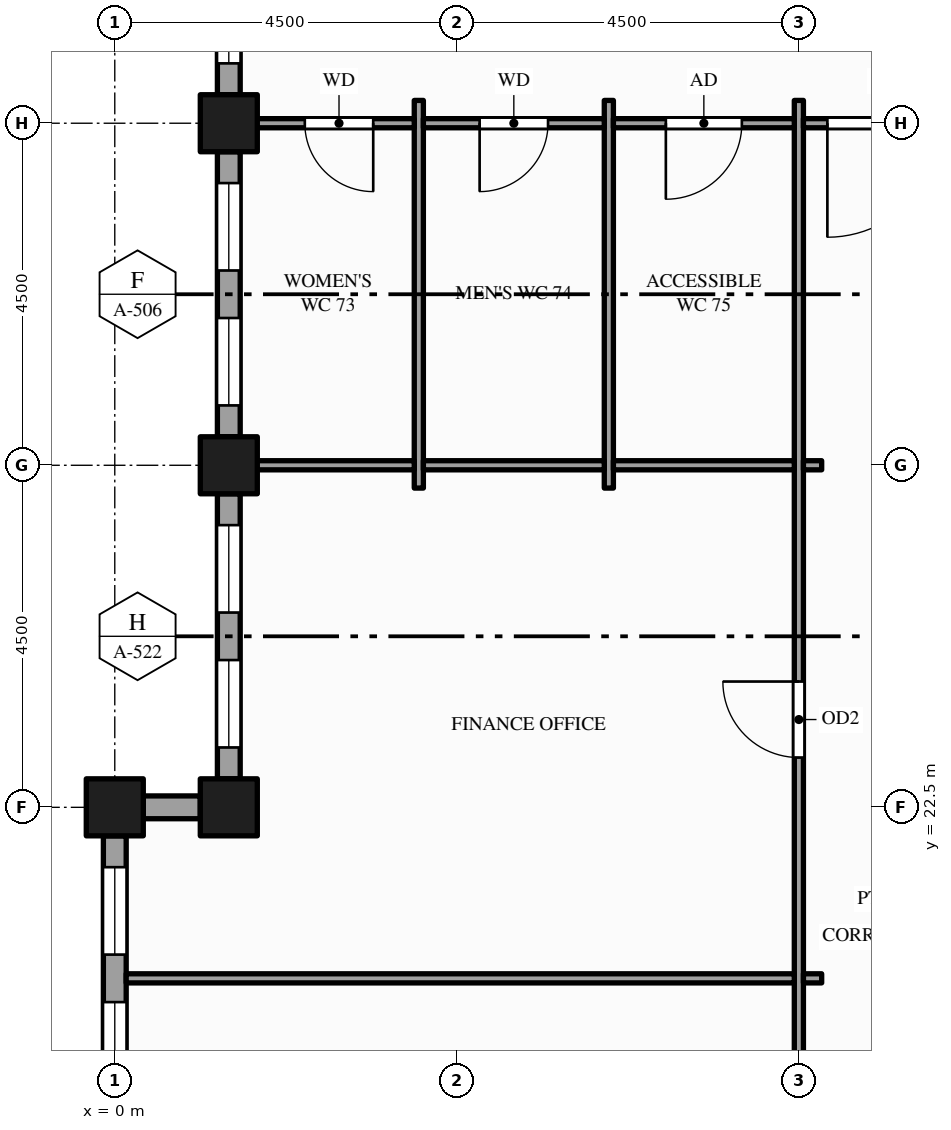
"""IFC4 building model, lengths in metres.
Left out: names, types, materials, properties, quantities, classifications, styles, units other than length and angle.
Written with IfcOpenShell. Run it as: python <this file> out.ifc"""

import sys

from ifc_helpers import new_model, si_unit, direction, frame, frame_2d, origin, origin_2d, place, context, subcontext, project, spatial, rectangle, hollow_rectangle, extrude, element, fill, save


model = new_model("IFC4")
c1 = context("Model", 3, precision=1e-05, world=origin(), true_north=direction((0.0, 1.0)))
c2 = subcontext(c1, "Body", "Model", "MODEL_VIEW")
j1 = project(units=[si_unit("LENGTHUNIT", "METRE"), si_unit("PLANEANGLEUNIT", "RADIAN")], contexts=[c1])
p1 = place(None, origin())
s1 = spatial("IfcSite", under=j1, at=p1, CompositionType="ELEMENT")
p2 = place(p1, origin())
s2 = spatial("IfcBuilding", under=s1, at=p2, CompositionType="ELEMENT")
p3 = place(p2, frame((0.0, 0.0, 223.0)))
s3 = spatial("IfcBuildingStorey", under=s2, at=p3, CompositionType="ELEMENT", Elevation=223.0)
for number, where, z_axis, x_axis in (
    (1, (0.0, 22.5, -0.15), (0.0, 0.0, 1.0), (1.0, 0.0, 0.0)),
    (2, (1.5, 22.5, -0.15), (0.0, 0.0, 1.0), (1.0, 0.0, 0.0)),
    (3, (1.5, 27.0, -0.15), (0.0, 0.0, 1.0), (1.0, 0.0, 0.0)),
    (4, (1.5, 31.5, -0.15), (0.0, 0.0, 1.0), (1.0, 0.0, 0.0)),
):
    element("IfcColumn", number, at=place(p3, frame(where, z_axis=z_axis, x_axis=x_axis)), inside=s3, PredefinedType="COLUMN", context=c2, shape_type="SweptSolid", body=[
        extrude(hollow_rectangle(XDim=0.75, YDim=0.75, WallThickness=0.036, at=origin_2d()), origin(), (0.0, 0.0, 1.0), 4.0),
    ])
p4 = place(p3, frame((1.5, 36.0, 0.0), z_axis=(0.0, 0.0, 1.0), x_axis=(0.0, -1.0, 0.0)))
e5 = element("IfcWall", 5, at=p4, inside=s3, PredefinedType="STANDARD", context=c2, shape_type="SweptSolid", body=[
    extrude(rectangle(XDim=4.125, YDim=0.3, at=frame_2d((2.062, 0.0))), origin(), (0.0, 0.0, 1.0), 3.157),
])
p5 = place(p4, frame((0.4, 0.0, 0.9)))
e6 = element("IfcOpeningElement", 6, at=p5, cuts=e5, PredefinedType="OPENING", context=c2, shape_type="SweptSolid", body=[
    extrude(rectangle(XDim=1.55, YDim=2.0, at=frame_2d((0.775, 1.0))), frame((0.0, 0.16, 0.0), z_axis=(0.0, -1.0, 0.0), x_axis=(1.0, 0.0, 0.0)), (0.0, 0.0, 1.0), 0.32),
])
p6 = place(p4, frame((2.562, 0.0, 0.9)))
e7 = element("IfcOpeningElement", 7, at=p6, cuts=e5, PredefinedType="OPENING", context=c2, shape_type="SweptSolid", body=[
    extrude(rectangle(XDim=1.15, YDim=2.0, at=frame_2d((0.575, 1.0))), frame((0.0, 0.16, 0.0), z_axis=(0.0, -1.0, 0.0), x_axis=(1.0, 0.0, 0.0)), (0.0, 0.0, 1.0), 0.32),
])
p7 = place(p3, frame((1.5, 31.125, 0.0), z_axis=(0.0, 0.0, 1.0), x_axis=(0.0, -1.0, 0.0)))
e8 = element("IfcWall", 8, at=p7, inside=s3, PredefinedType="STANDARD", context=c2, shape_type="SweptSolid", body=[
    extrude(rectangle(XDim=3.75, YDim=0.3, at=frame_2d((1.875, 0.0))), origin(), (0.0, 0.0, 1.0), 3.157),
])
p8 = place(p7, frame((0.413, 0.0, 0.9)))
e9 = element("IfcOpeningElement", 9, at=p8, cuts=e8, PredefinedType="OPENING", context=c2, shape_type="SweptSolid", body=[
    extrude(rectangle(XDim=1.15, YDim=2.0, at=frame_2d((0.575, 1.0))), frame((0.0, 0.16, 0.0), z_axis=(0.0, -1.0, 0.0), x_axis=(1.0, 0.0, 0.0)), (0.0, 0.0, 1.0), 0.32),
])
p9 = place(p7, frame((2.188, 0.0, 0.9)))
e10 = element("IfcOpeningElement", 10, at=p9, cuts=e8, PredefinedType="OPENING", context=c2, shape_type="SweptSolid", body=[
    extrude(rectangle(XDim=1.15, YDim=2.0, at=frame_2d((0.575, 1.0))), frame((0.0, 0.16, 0.0), z_axis=(0.0, -1.0, 0.0), x_axis=(1.0, 0.0, 0.0)), (0.0, 0.0, 1.0), 0.32),
])
p10 = place(p3, frame((1.5, 26.625, 0.0), z_axis=(0.0, 0.0, 1.0), x_axis=(0.0, -1.0, 0.0)))
e11 = element("IfcWall", 11, at=p10, inside=s3, PredefinedType="STANDARD", context=c2, shape_type="SweptSolid", body=[
    extrude(rectangle(XDim=3.75, YDim=0.3, at=frame_2d((1.875, 0.0))), origin(), (0.0, 0.0, 1.0), 3.157),
])
p11 = place(p10, frame((0.413, 0.0, 0.9)))
e12 = element("IfcOpeningElement", 12, at=p11, cuts=e11, PredefinedType="OPENING", context=c2, shape_type="SweptSolid", body=[
    extrude(rectangle(XDim=1.15, YDim=2.0, at=frame_2d((0.575, 1.0))), frame((0.0, 0.16, 0.0), z_axis=(0.0, -1.0, 0.0), x_axis=(1.0, 0.0, 0.0)), (0.0, 0.0, 1.0), 0.32),
])
p12 = place(p10, frame((2.188, 0.0, 0.9)))
e13 = element("IfcOpeningElement", 13, at=p12, cuts=e11, PredefinedType="OPENING", context=c2, shape_type="SweptSolid", body=[
    extrude(rectangle(XDim=1.15, YDim=2.0, at=frame_2d((0.575, 1.0))), frame((0.0, 0.16, 0.0), z_axis=(0.0, -1.0, 0.0), x_axis=(1.0, 0.0, 0.0)), (0.0, 0.0, 1.0), 0.32),
])
p13 = place(p3, frame((1.125, 22.5, 0.0), z_axis=(0.0, 0.0, 1.0), x_axis=(-1.0, 0.0, 0.0)))
e14 = element("IfcWall", 14, at=p13, inside=s3, PredefinedType="STANDARD", context=c2, shape_type="SweptSolid", body=[
    extrude(rectangle(XDim=0.75, YDim=0.3, at=frame_2d((0.375, 0.0))), origin(), (0.0, 0.0, 1.0), 3.157),
])
p14 = place(p3, frame((0.0, 22.125, 0.0), z_axis=(0.0, 0.0, 1.0), x_axis=(0.0, -1.0, 0.0)))
e15 = element("IfcWall", 15, at=p14, inside=s3, PredefinedType="STANDARD", context=c2, shape_type="SweptSolid", body=[
    extrude(rectangle(XDim=3.75, YDim=0.3, at=frame_2d((1.875, 0.0))), origin(), (0.0, 0.0, 1.0), 3.157),
])
p15 = place(p14, frame((0.413, 0.0, 0.9)))
e16 = element("IfcOpeningElement", 16, at=p15, cuts=e15, PredefinedType="OPENING", context=c2, shape_type="SweptSolid", body=[
    extrude(rectangle(XDim=1.15, YDim=2.0, at=frame_2d((0.575, 1.0))), frame((0.0, 0.16, 0.0), z_axis=(0.0, -1.0, 0.0), x_axis=(1.0, 0.0, 0.0)), (0.0, 0.0, 1.0), 0.32),
])
p16 = place(p14, frame((2.188, 0.0, 0.9)))
e17 = element("IfcOpeningElement", 17, at=p16, cuts=e15, PredefinedType="OPENING", context=c2, shape_type="SweptSolid", body=[
    extrude(rectangle(XDim=1.15, YDim=2.0, at=frame_2d((0.575, 1.0))), frame((0.0, 0.16, 0.0), z_axis=(0.0, -1.0, 0.0), x_axis=(1.0, 0.0, 0.0)), (0.0, 0.0, 1.0), 0.32),
])
for number, where, z_axis, x_axis in (
    (18, (4.0, 26.7, 0.0), (0.0, 0.0, 1.0), (0.0, 1.0, 0.0)),
    (19, (6.5, 26.7, 0.0), (0.0, 0.0, 1.0), (0.0, 1.0, 0.0)),
):
    element("IfcWall", number, at=place(p3, frame(where, z_axis=z_axis, x_axis=x_axis)), inside=s3, PredefinedType="PARTITIONING", context=c2, shape_type="SweptSolid", body=[
        extrude(rectangle(XDim=5.1, YDim=0.12, at=frame_2d((2.55, 0.0))), origin(), (0.0, 0.0, 1.0), 3.85),
    ])
p17 = place(p3, frame((9.0, 8.7, 0.0), z_axis=(0.0, 0.0, 1.0), x_axis=(0.0, 1.0, 0.0)))
e20 = element("IfcWall", 20, at=p17, inside=s3, PredefinedType="PARTITIONING", context=c2, shape_type="SweptSolid", body=[
    extrude(rectangle(XDim=23.1, YDim=0.12, at=frame_2d((11.55, 0.0))), origin(), (0.0, 0.0, 1.0), 2.6),
])
p18 = place(p17, frame((2.05, 0.0, 0.0)))
e21 = element("IfcOpeningElement", 21, at=p18, cuts=e20, PredefinedType="OPENING", context=c2, shape_type="SweptSolid", body=[
    extrude(rectangle(XDim=1.0, YDim=2.1, at=frame_2d((0.5, 1.05))), frame((0.0, 0.07, 0.0), z_axis=(0.0, -1.0, 0.0), x_axis=(1.0, 0.0, 0.0)), (0.0, 0.0, 1.0), 0.14),
])
p19 = place(p17, frame((7.675, 0.0, 0.0)))
e22 = element("IfcOpeningElement", 22, at=p19, cuts=e20, PredefinedType="OPENING", context=c2, shape_type="SweptSolid", body=[
    extrude(rectangle(XDim=1.0, YDim=2.1, at=frame_2d((0.5, 1.05))), frame((0.0, 0.07, 0.0), z_axis=(0.0, -1.0, 0.0), x_axis=(1.0, 0.0, 0.0)), (0.0, 0.0, 1.0), 0.14),
])
p20 = place(p17, frame((14.455, 0.0, 0.0)))
e23 = element("IfcOpeningElement", 23, at=p20, cuts=e20, PredefinedType="OPENING", context=c2, shape_type="SweptSolid", body=[
    extrude(rectangle(XDim=1.0, YDim=2.1, at=frame_2d((0.5, 1.05))), frame((0.0, 0.07, 0.0), z_axis=(0.0, -1.0, 0.0), x_axis=(1.0, 0.0, 0.0)), (0.0, 0.0, 1.0), 0.14),
])
p21 = place(p3, frame((0.15, 20.25, 0.0), z_axis=(0.0, 0.0, 1.0), x_axis=(1.0, 0.0, 0.0)))
e24 = element("IfcWall", 24, at=p21, inside=s3, PredefinedType="PARTITIONING", context=c2, shape_type="SweptSolid", body=[
    extrude(rectangle(XDim=8.79, YDim=0.12, at=frame_2d((4.395, 0.0))), origin(), (0.0, 0.0, 1.0), 2.87),
])
p22 = place(p3, frame((9.06, 20.25, 0.0), z_axis=(0.0, 0.0, 1.0), x_axis=(1.0, 0.0, 0.0)))
e25 = element("IfcWall", 25, at=p22, inside=s3, PredefinedType="PARTITIONING", context=c2, shape_type="SweptSolid", body=[
    extrude(rectangle(XDim=0.24, YDim=0.12, at=frame_2d((0.12, 0.0))), origin(), (0.0, 0.0, 1.0), 2.87),
])
p23 = place(p3, frame((1.65, 27.0, 0.0), z_axis=(0.0, 0.0, 1.0), x_axis=(1.0, 0.0, 0.0)))
e26 = element("IfcWall", 26, at=p23, inside=s3, PredefinedType="PARTITIONING", context=c2, shape_type="SweptSolid", body=[
    extrude(rectangle(XDim=2.29, YDim=0.12, at=frame_2d((1.145, 0.0))), origin(), (0.0, 0.0, 1.0), 2.87),
])
for number, where, z_axis, x_axis in (
    (27, (4.06, 27.0, 0.0), (0.0, 0.0, 1.0), (1.0, 0.0, 0.0)),
    (28, (6.56, 27.0, 0.0), (0.0, 0.0, 1.0), (1.0, 0.0, 0.0)),
):
    element("IfcWall", number, at=place(p3, frame(where, z_axis=z_axis, x_axis=x_axis)), inside=s3, PredefinedType="PARTITIONING", context=c2, shape_type="SweptSolid", body=[
        extrude(rectangle(XDim=2.38, YDim=0.12, at=frame_2d((1.19, 0.0))), origin(), (0.0, 0.0, 1.0), 2.87),
    ])
p24 = place(p3, frame((9.06, 27.0, 0.0), z_axis=(0.0, 0.0, 1.0), x_axis=(1.0, 0.0, 0.0)))
e29 = element("IfcWall", 29, at=p24, inside=s3, PredefinedType="PARTITIONING", context=c2, shape_type="SweptSolid", body=[
    extrude(rectangle(XDim=0.24, YDim=0.12, at=frame_2d((0.12, 0.0))), origin(), (0.0, 0.0, 1.0), 2.87),
])
p25 = place(p3, frame((1.65, 31.5, 0.0), z_axis=(0.0, 0.0, 1.0), x_axis=(1.0, 0.0, 0.0)))
e30 = element("IfcWall", 30, at=p25, inside=s3, PredefinedType="PARTITIONING", context=c2, shape_type="SweptSolid", body=[
    extrude(rectangle(XDim=2.29, YDim=0.12, at=frame_2d((1.145, 0.0))), origin(), (0.0, 0.0, 1.0), 2.87),
])
p26 = place(p25, frame((0.85, 0.0, 0.0)))
e31 = element("IfcOpeningElement", 31, at=p26, cuts=e30, PredefinedType="OPENING", context=c2, shape_type="SweptSolid", body=[
    extrude(rectangle(XDim=0.9, YDim=2.1, at=frame_2d((0.45, 1.05))), frame((0.0, 0.07, 0.0), z_axis=(0.0, -1.0, 0.0), x_axis=(1.0, 0.0, 0.0)), (0.0, 0.0, 1.0), 0.14),
])
p27 = place(p3, frame((4.06, 31.5, 0.0), z_axis=(0.0, 0.0, 1.0), x_axis=(1.0, 0.0, 0.0)))
e32 = element("IfcWall", 32, at=p27, inside=s3, PredefinedType="PARTITIONING", context=c2, shape_type="SweptSolid", body=[
    extrude(rectangle(XDim=2.38, YDim=0.12, at=frame_2d((1.19, 0.0))), origin(), (0.0, 0.0, 1.0), 2.87),
])
p28 = place(p27, frame((0.74, 0.0, 0.0)))
e33 = element("IfcOpeningElement", 33, at=p28, cuts=e32, PredefinedType="OPENING", context=c2, shape_type="SweptSolid", body=[
    extrude(rectangle(XDim=0.9, YDim=2.1, at=frame_2d((0.45, 1.05))), frame((0.0, 0.07, 0.0), z_axis=(0.0, -1.0, 0.0), x_axis=(1.0, 0.0, 0.0)), (0.0, 0.0, 1.0), 0.14),
])
p29 = place(p3, frame((6.56, 31.5, 0.0), z_axis=(0.0, 0.0, 1.0), x_axis=(1.0, 0.0, 0.0)))
e34 = element("IfcWall", 34, at=p29, inside=s3, PredefinedType="PARTITIONING", context=c2, shape_type="SweptSolid", body=[
    extrude(rectangle(XDim=2.38, YDim=0.12, at=frame_2d((1.19, 0.0))), origin(), (0.0, 0.0, 1.0), 2.87),
])
p30 = place(p29, frame((0.69, 0.0, 0.0)))
e35 = element("IfcOpeningElement", 35, at=p30, cuts=e34, PredefinedType="OPENING", context=c2, shape_type="SweptSolid", body=[
    extrude(rectangle(XDim=1.0, YDim=2.1, at=frame_2d((0.5, 1.05))), frame((0.0, 0.07, 0.0), z_axis=(0.0, -1.0, 0.0), x_axis=(1.0, 0.0, 0.0)), (0.0, 0.0, 1.0), 0.14),
])
p31 = place(p3, frame((9.06, 31.5, 0.0), z_axis=(0.0, 0.0, 1.0), x_axis=(1.0, 0.0, 0.0)))
e36 = element("IfcWall", 36, at=p31, inside=s3, PredefinedType="PARTITIONING", context=c2, shape_type="SweptSolid", body=[
    extrude(rectangle(XDim=2.13, YDim=0.12, at=frame_2d((1.065, 0.0))), origin(), (0.0, 0.0, 1.0), 2.87),
])
p32 = place(p31, frame((0.315, 0.0, 0.0)))
e37 = element("IfcOpeningElement", 37, at=p32, cuts=e36, PredefinedType="OPENING", context=c2, shape_type="SweptSolid", body=[
    extrude(rectangle(XDim=1.5, YDim=2.1, at=frame_2d((0.75, 1.05))), frame((0.0, 0.07, 0.0), z_axis=(0.0, -1.0, 0.0), x_axis=(1.0, 0.0, 0.0)), (0.0, 0.0, 1.0), 0.14),
])
p33 = place(p6, origin())
e38 = element("IfcWindow", 38, at=p33, inside=s3, PartitioningType="SINGLE_PANEL", PredefinedType="WINDOW", context=c2, shape_type="SweptSolid", body=[
    extrude(rectangle(XDim=1.15, YDim=2.0, at=frame_2d((0.575, 1.0))), frame((0.0, 0.03, 0.0), z_axis=(0.0, -1.0, 0.0), x_axis=(1.0, 0.0, 0.0)), (0.0, 0.0, 1.0), 0.06),
])
fill(e7, e38)
p34 = place(p8, origin())
e39 = element("IfcWindow", 39, at=p34, inside=s3, PartitioningType="SINGLE_PANEL", PredefinedType="WINDOW", context=c2, shape_type="SweptSolid", body=[
    extrude(rectangle(XDim=1.15, YDim=2.0, at=frame_2d((0.575, 1.0))), frame((0.0, 0.03, 0.0), z_axis=(0.0, -1.0, 0.0), x_axis=(1.0, 0.0, 0.0)), (0.0, 0.0, 1.0), 0.06),
])
fill(e9, e39)
p35 = place(p9, origin())
e40 = element("IfcWindow", 40, at=p35, inside=s3, PartitioningType="SINGLE_PANEL", PredefinedType="WINDOW", context=c2, shape_type="SweptSolid", body=[
    extrude(rectangle(XDim=1.15, YDim=2.0, at=frame_2d((0.575, 1.0))), frame((0.0, 0.03, 0.0), z_axis=(0.0, -1.0, 0.0), x_axis=(1.0, 0.0, 0.0)), (0.0, 0.0, 1.0), 0.06),
])
fill(e10, e40)
p36 = place(p11, origin())
e41 = element("IfcWindow", 41, at=p36, inside=s3, PartitioningType="SINGLE_PANEL", PredefinedType="WINDOW", context=c2, shape_type="SweptSolid", body=[
    extrude(rectangle(XDim=1.15, YDim=2.0, at=frame_2d((0.575, 1.0))), frame((0.0, 0.03, 0.0), z_axis=(0.0, -1.0, 0.0), x_axis=(1.0, 0.0, 0.0)), (0.0, 0.0, 1.0), 0.06),
])
fill(e12, e41)
p37 = place(p12, origin())
e42 = element("IfcWindow", 42, at=p37, inside=s3, PartitioningType="SINGLE_PANEL", PredefinedType="WINDOW", context=c2, shape_type="SweptSolid", body=[
    extrude(rectangle(XDim=1.15, YDim=2.0, at=frame_2d((0.575, 1.0))), frame((0.0, 0.03, 0.0), z_axis=(0.0, -1.0, 0.0), x_axis=(1.0, 0.0, 0.0)), (0.0, 0.0, 1.0), 0.06),
])
fill(e13, e42)
p38 = place(p15, origin())
e43 = element("IfcWindow", 43, at=p38, inside=s3, PartitioningType="SINGLE_PANEL", PredefinedType="WINDOW", context=c2, shape_type="SweptSolid", body=[
    extrude(rectangle(XDim=1.15, YDim=2.0, at=frame_2d((0.575, 1.0))), frame((0.0, 0.03, 0.0), z_axis=(0.0, -1.0, 0.0), x_axis=(1.0, 0.0, 0.0)), (0.0, 0.0, 1.0), 0.06),
])
fill(e16, e43)
p39 = place(p16, origin())
e44 = element("IfcWindow", 44, at=p39, inside=s3, PartitioningType="SINGLE_PANEL", PredefinedType="WINDOW", context=c2, shape_type="SweptSolid", body=[
    extrude(rectangle(XDim=1.15, YDim=2.0, at=frame_2d((0.575, 1.0))), frame((0.0, 0.03, 0.0), z_axis=(0.0, -1.0, 0.0), x_axis=(1.0, 0.0, 0.0)), (0.0, 0.0, 1.0), 0.06),
])
fill(e17, e44)
p40 = place(p32, origin())
e45 = element("IfcDoor", 45, at=p40, inside=s3, OperationType="SINGLE_SWING_LEFT", PredefinedType="DOOR", context=c2, shape_type="SweptSolid", body=[
    extrude(rectangle(XDim=1.5, YDim=2.1, at=frame_2d((0.75, 1.05))), frame((0.0, 0.025, 0.0), z_axis=(0.0, -1.0, 0.0), x_axis=(1.0, 0.0, 0.0)), (0.0, 0.0, 1.0), 0.05),
])
fill(e37, e45)
p41 = place(p20, origin())
e46 = element("IfcDoor", 46, at=p41, inside=s3, OperationType="SINGLE_SWING_RIGHT", PredefinedType="DOOR", context=c2, shape_type="SweptSolid", body=[
    extrude(rectangle(XDim=1.0, YDim=2.1, at=frame_2d((0.5, 1.05))), frame((0.0, 0.025, 0.0), z_axis=(0.0, -1.0, 0.0), x_axis=(1.0, 0.0, 0.0)), (0.0, 0.0, 1.0), 0.05),
])
fill(e23, e46)
p42 = place(p26, origin())
e47 = element("IfcDoor", 47, at=p42, inside=s3, OperationType="SINGLE_SWING_RIGHT", PredefinedType="DOOR", context=c2, shape_type="SweptSolid", body=[
    extrude(rectangle(XDim=0.9, YDim=2.1, at=frame_2d((0.45, 1.05))), frame((0.0, 0.025, 0.0), z_axis=(0.0, -1.0, 0.0), x_axis=(1.0, 0.0, 0.0)), (0.0, 0.0, 1.0), 0.05),
])
fill(e31, e47)
p43 = place(p28, origin())
e48 = element("IfcDoor", 48, at=p43, inside=s3, OperationType="SINGLE_SWING_LEFT", PredefinedType="DOOR", context=c2, shape_type="SweptSolid", body=[
    extrude(rectangle(XDim=0.9, YDim=2.1, at=frame_2d((0.45, 1.05))), frame((0.0, 0.025, 0.0), z_axis=(0.0, -1.0, 0.0), x_axis=(1.0, 0.0, 0.0)), (0.0, 0.0, 1.0), 0.05),
])
fill(e33, e48)
p44 = place(p30, origin())
e49 = element("IfcDoor", 49, at=p44, inside=s3, OperationType="SINGLE_SWING_LEFT", PredefinedType="DOOR", context=c2, shape_type="SweptSolid", body=[
    extrude(rectangle(XDim=1.0, YDim=2.1, at=frame_2d((0.5, 1.05))), frame((0.0, 0.025, 0.0), z_axis=(0.0, -1.0, 0.0), x_axis=(1.0, 0.0, 0.0)), (0.0, 0.0, 1.0), 0.05),
])
fill(e35, e49)
save(model, sys.argv[1])
